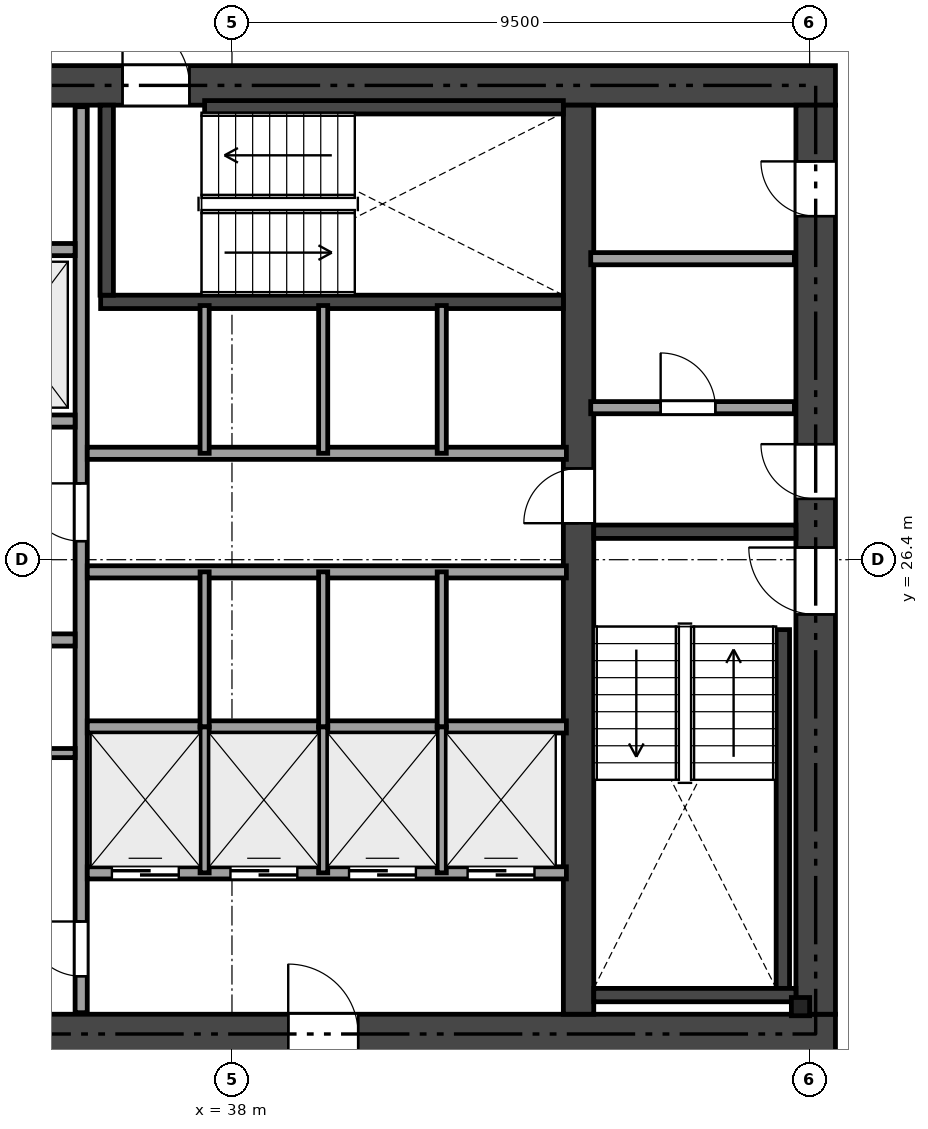
"""IFC4 building model, lengths in metres.
Left out: names, types, materials, properties, quantities, classifications, styles, units other than length and angle.
Written with IfcOpenShell. Run it as: python <this file> out.ifc"""

import sys

from ifc_helpers import new_model, si_unit, direction, frame, frame_2d, origin, origin_2d, place, context, subcontext, project, spatial, rectangle, i_section, extrude, element, fill, save


model = new_model("IFC4")
c1 = context("Model", 3, precision=1e-05, world=origin(), true_north=direction((0.0, 1.0)))
c2 = subcontext(c1, "Body", "Model", "MODEL_VIEW")
j1 = project(units=[si_unit("LENGTHUNIT", "METRE"), si_unit("PLANEANGLEUNIT", "RADIAN")], contexts=[c1])
p1 = place(None, origin())
s1 = spatial("IfcSite", under=j1, at=p1, CompositionType="ELEMENT")
p2 = place(p1, origin())
s2 = spatial("IfcBuilding", under=s1, at=p2, CompositionType="ELEMENT")
p3 = place(p2, frame((0.0, 0.0, 51.15)))
s3 = spatial("IfcBuildingStorey", under=s2, at=p3, CompositionType="ELEMENT", Elevation=51.15)
p4 = place(p3, frame((26.475, 18.6, 0.0), z_axis=(0.0, 0.0, 1.0), x_axis=(1.0, 0.0, 0.0)))
e1 = element("IfcWall", 1, at=p4, inside=s3, PredefinedType="SHEAR", context=c2, shape_type="SweptSolid", body=[
    extrude(rectangle(XDim=21.45, YDim=0.65, at=frame_2d((10.725, 0.0))), origin(), (0.0, 0.0, 1.0), 3.17),
])
p5 = place(p4, frame((12.45, 0.0, 0.0)))
e2 = element("IfcOpeningElement", 2, at=p5, cuts=e1, PredefinedType="OPENING", context=c2, shape_type="SweptSolid", body=[
    extrude(rectangle(XDim=1.15, YDim=2.15, at=frame_2d((0.575, 1.075))), frame((0.0, 0.335, 0.0), z_axis=(0.0, -1.0, 0.0), x_axis=(1.0, 0.0, 0.0)), (0.0, 0.0, 1.0), 0.67),
])
p6 = place(p4, frame((5.275, 0.0, 0.0)))
e3 = element("IfcOpeningElement", 3, at=p6, cuts=e1, PredefinedType="OPENING", context=c2, shape_type="SweptSolid", body=[
    extrude(rectangle(XDim=0.9, YDim=2.1, at=frame_2d((0.45, 1.05))), frame((0.0, 0.335, 0.0), z_axis=(0.0, -1.0, 0.0), x_axis=(1.0, 0.0, 0.0)), (0.0, 0.0, 1.0), 0.67),
])
p7 = place(p3, frame((26.475, 34.2, 0.0), z_axis=(0.0, 0.0, 1.0), x_axis=(1.0, 0.0, 0.0)))
e4 = element("IfcWall", 4, at=p7, inside=s3, PredefinedType="SHEAR", context=c2, shape_type="SweptSolid", body=[
    extrude(rectangle(XDim=21.45, YDim=0.65, at=frame_2d((10.725, 0.0))), origin(), (0.0, 0.0, 1.0), 3.17),
])
p8 = place(p7, frame((9.725, 0.0, 0.0)))
e5 = element("IfcOpeningElement", 5, at=p8, cuts=e4, PredefinedType="OPENING", context=c2, shape_type="SweptSolid", body=[
    extrude(rectangle(XDim=1.1, YDim=2.15, at=frame_2d((0.55, 1.075))), frame((0.0, 0.335, 0.0), z_axis=(0.0, -1.0, 0.0), x_axis=(1.0, 0.0, 0.0)), (0.0, 0.0, 1.0), 0.67),
])
p9 = place(p7, frame((1.975, 0.0, 0.0)))
e6 = element("IfcOpeningElement", 6, at=p9, cuts=e4, PredefinedType="OPENING", context=c2, shape_type="SweptSolid", body=[
    extrude(rectangle(XDim=0.9, YDim=2.1, at=frame_2d((0.45, 1.05))), frame((0.0, 0.335, 0.0), z_axis=(0.0, -1.0, 0.0), x_axis=(1.0, 0.0, 0.0)), (0.0, 0.0, 1.0), 0.67),
])
p10 = place(p7, frame((6.275, 0.0, 0.0)))
e7 = element("IfcOpeningElement", 7, at=p10, cuts=e4, PredefinedType="OPENING", context=c2, shape_type="SweptSolid", body=[
    extrude(rectangle(XDim=0.9, YDim=2.1, at=frame_2d((0.45, 1.05))), frame((0.0, 0.335, 0.0), z_axis=(0.0, -1.0, 0.0), x_axis=(1.0, 0.0, 0.0)), (0.0, 0.0, 1.0), 0.67),
])
p11 = place(p3, frame((47.6, 18.925, 0.0), z_axis=(0.0, 0.0, 1.0), x_axis=(0.0, 1.0, 0.0)))
e8 = element("IfcWall", 8, at=p11, inside=s3, PredefinedType="SHEAR", context=c2, shape_type="SweptSolid", body=[
    extrude(rectangle(XDim=14.95, YDim=0.65, at=frame_2d((7.475, 0.0))), origin(), (0.0, 0.0, 1.0), 3.17),
])
p12 = place(p11, frame((6.575, 0.0, 0.0)))
e9 = element("IfcOpeningElement", 9, at=p12, cuts=e8, PredefinedType="OPENING", context=c2, shape_type="SweptSolid", body=[
    extrude(rectangle(XDim=1.1, YDim=2.15, at=frame_2d((0.55, 1.075))), frame((0.0, 0.335, 0.0), z_axis=(0.0, -1.0, 0.0), x_axis=(1.0, 0.0, 0.0)), (0.0, 0.0, 1.0), 0.67),
])
p13 = place(p11, frame((8.475, 0.0, 0.0)))
e10 = element("IfcOpeningElement", 10, at=p13, cuts=e8, PredefinedType="OPENING", context=c2, shape_type="SweptSolid", body=[
    extrude(rectangle(XDim=0.9, YDim=2.1, at=frame_2d((0.45, 1.05))), frame((0.0, 0.335, 0.0), z_axis=(0.0, -1.0, 0.0), x_axis=(1.0, 0.0, 0.0)), (0.0, 0.0, 1.0), 0.67),
])
p14 = place(p11, frame((13.125, 0.0, 0.0)))
e11 = element("IfcOpeningElement", 11, at=p14, cuts=e8, PredefinedType="OPENING", context=c2, shape_type="SweptSolid", body=[
    extrude(rectangle(XDim=0.9, YDim=2.1, at=frame_2d((0.45, 1.05))), frame((0.0, 0.335, 0.0), z_axis=(0.0, -1.0, 0.0), x_axis=(1.0, 0.0, 0.0)), (0.0, 0.0, 1.0), 0.67),
])
p15 = place(p3, frame((43.7, 18.925, 0.0), z_axis=(0.0, 0.0, 1.0), x_axis=(0.0, 1.0, 0.0)))
e12 = element("IfcWall", 12, at=p15, inside=s3, PredefinedType="SHEAR", context=c2, shape_type="SweptSolid", body=[
    extrude(rectangle(XDim=14.95, YDim=0.5, at=frame_2d((7.475, 0.0))), origin(), (0.0, 0.0, 1.0), 3.17),
])
p16 = place(p15, frame((8.075, 0.0, 0.0)))
e13 = element("IfcOpeningElement", 13, at=p16, cuts=e12, PredefinedType="OPENING", context=c2, shape_type="SweptSolid", body=[
    extrude(rectangle(XDim=0.9, YDim=2.1, at=frame_2d((0.45, 1.05))), frame((0.0, 0.26, 0.0), z_axis=(0.0, -1.0, 0.0), x_axis=(1.0, 0.0, 0.0)), (0.0, 0.0, 1.0), 0.52),
])
p17 = place(p3, frame((43.95, 26.86, 0.0), z_axis=(0.0, 0.0, 1.0), x_axis=(1.0, 0.0, 0.0)))
e14 = element("IfcWall", 14, at=p17, inside=s3, PredefinedType="SHEAR", context=c2, shape_type="SweptSolid", body=[
    extrude(rectangle(XDim=3.325, YDim=0.22, at=frame_2d((1.663, 0.0))), origin(), (0.0, 0.0, 1.0), 3.17),
])
p18 = place(p3, frame((47.06, 19.35, 0.0), z_axis=(0.0, 0.0, 1.0), x_axis=(0.0, 1.0, 0.0)))
e15 = element("IfcWall", 15, at=p18, inside=s3, PredefinedType="SHEAR", context=c2, shape_type="SweptSolid", body=[
    extrude(rectangle(XDim=5.9, YDim=0.22, at=frame_2d((2.95, 0.0))), origin(), (0.0, 0.0, 1.0), 3.17),
])
p19 = place(p3, frame((43.95, 19.24, 0.0), z_axis=(0.0, 0.0, 1.0), x_axis=(1.0, 0.0, 0.0)))
e16 = element("IfcWall", 16, at=p19, inside=s3, PredefinedType="SHEAR", context=c2, shape_type="SweptSolid", body=[
    extrude(rectangle(XDim=3.325, YDim=0.22, at=frame_2d((1.663, 0.0))), origin(), (0.0, 0.0, 1.0), 3.17),
])
p20 = place(p3, frame((35.84, 30.64, 0.0), z_axis=(0.0, 0.0, 1.0), x_axis=(1.0, 0.0, 0.0)))
e17 = element("IfcWall", 17, at=p20, inside=s3, PredefinedType="SHEAR", context=c2, shape_type="SweptSolid", body=[
    extrude(rectangle(XDim=7.61, YDim=0.22, at=frame_2d((3.805, 0.0))), origin(), (0.0, 0.0, 1.0), 3.17),
])
p21 = place(p3, frame((35.94, 30.75, 0.0), z_axis=(0.0, 0.0, 1.0), x_axis=(0.0, 1.0, 0.0)))
e18 = element("IfcWall", 18, at=p21, inside=s3, PredefinedType="SHEAR", context=c2, shape_type="SweptSolid", body=[
    extrude(rectangle(XDim=3.125, YDim=0.22, at=frame_2d((1.562, 0.0))), origin(), (0.0, 0.0, 1.0), 3.17),
])
p22 = place(p3, frame((37.55, 33.84, 0.0), z_axis=(0.0, 0.0, 1.0), x_axis=(1.0, 0.0, 0.0)))
e19 = element("IfcWall", 19, at=p22, inside=s3, PredefinedType="SHEAR", context=c2, shape_type="SweptSolid", body=[
    extrude(rectangle(XDim=5.9, YDim=0.22, at=frame_2d((2.95, 0.0))), origin(), (0.0, 0.0, 1.0), 3.17),
])
p23 = place(p3, frame((47.35, 19.05, 0.0), z_axis=(0.0, 0.0, 1.0), x_axis=(1.0, 0.0, 0.0)))
e20 = element("IfcColumn", 20, at=p23, inside=s3, PredefinedType="PILASTER", context=c2, shape_type="SweptSolid", body=[
    extrude(i_section(OverallWidth=0.3, OverallDepth=0.3, WebThickness=0.011, FlangeThickness=0.019, at=origin_2d()), origin(), (0.0, 0.0, 1.0), 3.17),
])
p24 = place(p3, frame((43.9, 28.9, 0.0), z_axis=(0.0, 0.0, 1.0), x_axis=(1.0, 0.0, 0.0)))
e21 = element("IfcWall", 21, at=p24, inside=s3, PredefinedType="SOLIDWALL", context=c2, shape_type="SweptSolid", body=[
    extrude(rectangle(XDim=3.35, YDim=0.2, at=frame_2d((1.675, 0.0))), origin(), (0.0, 0.0, 1.0), 3.17),
])
p25 = place(p24, frame((1.15, 0.0, 0.0)))
e22 = element("IfcOpeningElement", 22, at=p25, cuts=e21, PredefinedType="OPENING", context=c2, shape_type="SweptSolid", body=[
    extrude(rectangle(XDim=0.9, YDim=2.1, at=frame_2d((0.45, 1.05))), frame((0.0, 0.11, 0.0), z_axis=(0.0, -1.0, 0.0), x_axis=(1.0, 0.0, 0.0)), (0.0, 0.0, 1.0), 0.22),
])
p26 = place(p3, frame((43.9, 31.35, 0.0), z_axis=(0.0, 0.0, 1.0), x_axis=(1.0, 0.0, 0.0)))
e23 = element("IfcWall", 23, at=p26, inside=s3, PredefinedType="SOLIDWALL", context=c2, shape_type="SweptSolid", body=[
    extrude(rectangle(XDim=3.35, YDim=0.2, at=frame_2d((1.675, 0.0))), origin(), (0.0, 0.0, 1.0), 3.17),
])
p27 = place(p3, frame((35.52, 18.95, 0.0), z_axis=(0.0, 0.0, 1.0), x_axis=(0.0, 1.0, 0.0)))
e24 = element("IfcWall", 24, at=p27, inside=s3, PredefinedType="SOLIDWALL", context=c2, shape_type="SweptSolid", body=[
    extrude(rectangle(XDim=14.9, YDim=0.2, at=frame_2d((7.45, 0.0))), origin(), (0.0, 0.0, 1.0), 2.691),
])
p28 = place(p27, frame((7.755, 0.0, 0.0)))
e25 = element("IfcOpeningElement", 25, at=p28, cuts=e24, PredefinedType="OPENING", context=c2, shape_type="SweptSolid", body=[
    extrude(rectangle(XDim=0.95, YDim=2.15, at=frame_2d((0.475, 1.075))), frame((0.0, 0.11, 0.0), z_axis=(0.0, -1.0, 0.0), x_axis=(1.0, 0.0, 0.0)), (0.0, 0.0, 1.0), 0.22),
])
p29 = place(p27, frame((0.6, 0.0, 0.0)))
e26 = element("IfcOpeningElement", 26, at=p29, cuts=e24, PredefinedType="OPENING", context=c2, shape_type="SweptSolid", body=[
    extrude(rectangle(XDim=0.9, YDim=2.1, at=frame_2d((0.45, 1.05))), frame((0.0, 0.11, 0.0), z_axis=(0.0, -1.0, 0.0), x_axis=(1.0, 0.0, 0.0)), (0.0, 0.0, 1.0), 0.22),
])
p30 = place(p3, frame((31.0, 28.68, 0.0), z_axis=(0.0, 0.0, 1.0), x_axis=(1.0, 0.0, 0.0)))
e27 = element("IfcWall", 27, at=p30, inside=s3, PredefinedType="SOLIDWALL", context=c2, shape_type="SweptSolid", body=[
    extrude(rectangle(XDim=4.42, YDim=0.2, at=frame_2d((2.21, 0.0))), origin(), (0.0, 0.0, 1.0), 3.17),
])
p31 = place(p30, frame((0.6, 0.0, 0.0)))
e28 = element("IfcOpeningElement", 28, at=p31, cuts=e27, PredefinedType="OPENING", context=c2, shape_type="SweptSolid", body=[
    extrude(rectangle(XDim=1.1, YDim=2.15, at=frame_2d((0.55, 1.075))), frame((0.0, 0.11, 0.0), z_axis=(0.0, -1.0, 0.0), x_axis=(1.0, 0.0, 0.0)), (0.0, 0.0, 1.0), 0.22),
])
p32 = place(p30, frame((2.85, 0.0, 0.0)))
e29 = element("IfcOpeningElement", 29, at=p32, cuts=e27, PredefinedType="OPENING", context=c2, shape_type="SweptSolid", body=[
    extrude(rectangle(XDim=1.1, YDim=2.15, at=frame_2d((0.55, 1.075))), frame((0.0, 0.11, 0.0), z_axis=(0.0, -1.0, 0.0), x_axis=(1.0, 0.0, 0.0)), (0.0, 0.0, 1.0), 0.22),
])
p33 = place(p3, frame((31.0, 31.5, 0.0), z_axis=(0.0, 0.0, 1.0), x_axis=(1.0, 0.0, 0.0)))
e30 = element("IfcWall", 30, at=p33, inside=s3, PredefinedType="SOLIDWALL", context=c2, shape_type="SweptSolid", body=[
    extrude(rectangle(XDim=4.42, YDim=0.2, at=frame_2d((2.21, 0.0))), origin(), (0.0, 0.0, 1.0), 3.17),
])
p34 = place(p3, frame((31.0, 25.08, 0.0), z_axis=(0.0, 0.0, 1.0), x_axis=(1.0, 0.0, 0.0)))
e31 = element("IfcWall", 31, at=p34, inside=s3, PredefinedType="SOLIDWALL", context=c2, shape_type="SweptSolid", body=[
    extrude(rectangle(XDim=4.42, YDim=0.2, at=frame_2d((2.21, 0.0))), origin(), (0.0, 0.0, 1.0), 3.17),
])
p35 = place(p34, frame((3.0, 0.0, 0.0)))
e32 = element("IfcOpeningElement", 32, at=p35, cuts=e31, PredefinedType="OPENING", context=c2, shape_type="SweptSolid", body=[
    extrude(rectangle(XDim=0.9, YDim=2.1, at=frame_2d((0.45, 1.05))), frame((0.0, 0.11, 0.0), z_axis=(0.0, -1.0, 0.0), x_axis=(1.0, 0.0, 0.0)), (0.0, 0.0, 1.0), 0.22),
])
p36 = place(p34, frame((0.62, 0.0, 0.0)))
e33 = element("IfcOpeningElement", 33, at=p36, cuts=e31, PredefinedType="OPENING", context=c2, shape_type="SweptSolid", body=[
    extrude(rectangle(XDim=1.2, YDim=2.15, at=frame_2d((0.6, 1.075))), frame((0.0, 0.11, 0.0), z_axis=(0.0, -1.0, 0.0), x_axis=(1.0, 0.0, 0.0)), (0.0, 0.0, 1.0), 0.22),
])
p37 = place(p3, frame((33.42, 23.22, 0.0), z_axis=(0.0, 0.0, 1.0), x_axis=(1.0, 0.0, 0.0)))
e34 = element("IfcWall", 34, at=p37, inside=s3, PredefinedType="PARTITIONING", context=c2, shape_type="SweptSolid", body=[
    extrude(rectangle(XDim=2.0, YDim=0.15, at=frame_2d((1.0, 0.0))), origin(), (0.0, 0.0, 1.0), 3.17),
])
for number, where, z_axis, x_axis in (
    (35, (35.62, 28.15, 0.0), (0.0, 0.0, 1.0), (1.0, 0.0, 0.0)),
    (36, (35.62, 26.2, 0.0), (0.0, 0.0, 1.0), (1.0, 0.0, 0.0)),
):
    element("IfcWall", number, at=place(p3, frame(where, z_axis=z_axis, x_axis=x_axis)), inside=s3, PredefinedType="SOLIDWALL", context=c2, shape_type="SweptSolid", body=[
        extrude(rectangle(XDim=7.88, YDim=0.2, at=frame_2d((3.94, 0.0))), origin(), (0.0, 0.0, 1.0), 3.17),
    ])
p38 = place(p3, frame((35.62, 23.65, 0.0), z_axis=(0.0, 0.0, 1.0), x_axis=(1.0, 0.0, 0.0)))
e37 = element("IfcWall", 37, at=p38, inside=s3, PredefinedType="SOLIDWALL", context=c2, shape_type="SweptSolid", body=[
    extrude(rectangle(XDim=7.88, YDim=0.2, at=frame_2d((3.94, 0.0))), origin(), (0.0, 0.0, 1.0), 2.691),
])
p39 = place(p3, frame((35.62, 21.25, 0.0), z_axis=(0.0, 0.0, 1.0), x_axis=(1.0, 0.0, 0.0)))
e38 = element("IfcWall", 38, at=p39, inside=s3, PredefinedType="SOLIDWALL", context=c2, shape_type="SweptSolid", body=[
    extrude(rectangle(XDim=7.88, YDim=0.2, at=frame_2d((3.94, 0.0))), origin(), (0.0, 0.0, 1.0), 3.17),
])
p40 = place(p39, frame((0.405, 0.0, 0.0)))
e39 = element("IfcOpeningElement", 39, at=p40, cuts=e38, PredefinedType="OPENING", context=c2, shape_type="SweptSolid", body=[
    extrude(rectangle(XDim=1.1, YDim=2.15, at=frame_2d((0.55, 1.075))), frame((0.0, 0.11, 0.0), z_axis=(0.0, -1.0, 0.0), x_axis=(1.0, 0.0, 0.0)), (0.0, 0.0, 1.0), 0.22),
])
p41 = place(p39, frame((2.355, 0.0, 0.0)))
e40 = element("IfcOpeningElement", 40, at=p41, cuts=e38, PredefinedType="OPENING", context=c2, shape_type="SweptSolid", body=[
    extrude(rectangle(XDim=1.1, YDim=2.15, at=frame_2d((0.55, 1.075))), frame((0.0, 0.11, 0.0), z_axis=(0.0, -1.0, 0.0), x_axis=(1.0, 0.0, 0.0)), (0.0, 0.0, 1.0), 0.22),
])
p42 = place(p39, frame((4.305, 0.0, 0.0)))
e41 = element("IfcOpeningElement", 41, at=p42, cuts=e38, PredefinedType="OPENING", context=c2, shape_type="SweptSolid", body=[
    extrude(rectangle(XDim=1.1, YDim=2.15, at=frame_2d((0.55, 1.075))), frame((0.0, 0.11, 0.0), z_axis=(0.0, -1.0, 0.0), x_axis=(1.0, 0.0, 0.0)), (0.0, 0.0, 1.0), 0.22),
])
p43 = place(p39, frame((6.255, 0.0, 0.0)))
e42 = element("IfcOpeningElement", 42, at=p43, cuts=e38, PredefinedType="OPENING", context=c2, shape_type="SweptSolid", body=[
    extrude(rectangle(XDim=1.1, YDim=2.15, at=frame_2d((0.55, 1.075))), frame((0.0, 0.11, 0.0), z_axis=(0.0, -1.0, 0.0), x_axis=(1.0, 0.0, 0.0)), (0.0, 0.0, 1.0), 0.22),
])
for number, where, z_axis, x_axis in (
    (43, (37.55, 28.15, 0.0), (0.0, 0.0, 1.0), (0.0, 1.0, 0.0)),
    (44, (39.5, 28.15, 0.0), (0.0, 0.0, 1.0), (0.0, 1.0, 0.0)),
    (45, (41.45, 28.15, 0.0), (0.0, 0.0, 1.0), (0.0, 1.0, 0.0)),
):
    element("IfcWall", number, at=place(p3, frame(where, z_axis=z_axis, x_axis=x_axis)), inside=s3, PredefinedType="PARTITIONING", context=c2, shape_type="SweptSolid", body=[
        extrude(rectangle(XDim=2.43, YDim=0.15, at=frame_2d((1.215, 0.0))), origin(), (0.0, 0.0, 1.0), 3.17),
    ])
for number, where, z_axis, x_axis in (
    (46, (37.55, 23.65, 0.0), (0.0, 0.0, 1.0), (0.0, 1.0, 0.0)),
    (47, (39.5, 23.65, 0.0), (0.0, 0.0, 1.0), (0.0, 1.0, 0.0)),
    (48, (41.45, 23.65, 0.0), (0.0, 0.0, 1.0), (0.0, 1.0, 0.0)),
):
    element("IfcWall", number, at=place(p3, frame(where, z_axis=z_axis, x_axis=x_axis)), inside=s3, PredefinedType="PARTITIONING", context=c2, shape_type="SweptSolid", body=[
        extrude(rectangle(XDim=2.55, YDim=0.15, at=frame_2d((1.275, 0.0))), origin(), (0.0, 0.0, 1.0), 2.691),
    ])
for number, where, z_axis, x_axis in (
    (49, (37.55, 21.25, 0.0), (0.0, 0.0, 1.0), (0.0, 1.0, 0.0)),
    (50, (39.5, 21.25, 0.0), (0.0, 0.0, 1.0), (0.0, 1.0, 0.0)),
    (51, (41.45, 21.25, 0.0), (0.0, 0.0, 1.0), (0.0, 1.0, 0.0)),
):
    element("IfcWall", number, at=place(p3, frame(where, z_axis=z_axis, x_axis=x_axis)), inside=s3, PredefinedType="PARTITIONING", context=c2, shape_type="SweptSolid", body=[
        extrude(rectangle(XDim=2.4, YDim=0.15, at=frame_2d((1.2, 0.0))), origin(), (0.0, 0.0, 1.0), 2.691),
    ])
p44 = place(p12, origin())
e52 = element("IfcDoor", 52, at=p44, inside=s3, OperationType="SINGLE_SWING_RIGHT", PredefinedType="DOOR", context=c2, shape_type="SweptSolid", body=[
    extrude(rectangle(XDim=1.1, YDim=2.15, at=frame_2d((0.55, 1.075))), frame((0.0, 0.025, 0.0), z_axis=(0.0, -1.0, 0.0), x_axis=(1.0, 0.0, 0.0)), (0.0, 0.0, 1.0), 0.05),
])
fill(e9, e52)
p45 = place(p8, origin())
e53 = element("IfcDoor", 53, at=p45, inside=s3, OperationType="SINGLE_SWING_LEFT", PredefinedType="DOOR", context=c2, shape_type="SweptSolid", body=[
    extrude(rectangle(XDim=1.1, YDim=2.15, at=frame_2d((0.55, 1.075))), frame((0.0, 0.025, 0.0), z_axis=(0.0, -1.0, 0.0), x_axis=(1.0, 0.0, 0.0)), (0.0, 0.0, 1.0), 0.05),
])
fill(e5, e53)
p46 = place(p28, origin())
e54 = element("IfcDoor", 54, at=p46, inside=s3, OperationType="SINGLE_SWING_RIGHT", PredefinedType="DOOR", context=c2, shape_type="SweptSolid", body=[
    extrude(rectangle(XDim=0.95, YDim=2.15, at=frame_2d((0.475, 1.075))), frame((0.0, 0.025, 0.0), z_axis=(0.0, -1.0, 0.0), x_axis=(1.0, 0.0, 0.0)), (0.0, 0.0, 1.0), 0.05),
])
fill(e25, e54)
p47 = place(p16, origin())
e55 = element("IfcDoor", 55, at=p47, inside=s3, OperationType="SINGLE_SWING_LEFT", PredefinedType="DOOR", context=c2, shape_type="SweptSolid", body=[
    extrude(rectangle(XDim=0.9, YDim=2.1, at=frame_2d((0.45, 1.05))), frame((0.0, 0.025, 0.0), z_axis=(0.0, -1.0, 0.0), x_axis=(1.0, 0.0, 0.0)), (0.0, 0.0, 1.0), 0.05),
])
fill(e13, e55)
p48 = place(p13, origin())
e56 = element("IfcDoor", 56, at=p48, inside=s3, OperationType="SINGLE_SWING_RIGHT", PredefinedType="DOOR", context=c2, shape_type="SweptSolid", body=[
    extrude(rectangle(XDim=0.9, YDim=2.1, at=frame_2d((0.45, 1.05))), frame((0.0, 0.025, 0.0), z_axis=(0.0, -1.0, 0.0), x_axis=(1.0, 0.0, 0.0)), (0.0, 0.0, 1.0), 0.05),
])
fill(e10, e56)
p49 = place(p5, origin())
e57 = element("IfcDoor", 57, at=p49, inside=s3, OperationType="SINGLE_SWING_LEFT", PredefinedType="DOOR", context=c2, shape_type="SweptSolid", body=[
    extrude(rectangle(XDim=1.15, YDim=2.15, at=frame_2d((0.575, 1.075))), frame((0.0, 0.025, 0.0), z_axis=(0.0, -1.0, 0.0), x_axis=(1.0, 0.0, 0.0)), (0.0, 0.0, 1.0), 0.05),
])
fill(e2, e57)
p50 = place(p25, origin())
e58 = element("IfcDoor", 58, at=p50, inside=s3, OperationType="SINGLE_SWING_LEFT", PredefinedType="DOOR", context=c2, shape_type="SweptSolid", body=[
    extrude(rectangle(XDim=0.9, YDim=2.1, at=frame_2d((0.45, 1.05))), frame((0.0, 0.025, 0.0), z_axis=(0.0, -1.0, 0.0), x_axis=(1.0, 0.0, 0.0)), (0.0, 0.0, 1.0), 0.05),
])
fill(e22, e58)
p51 = place(p14, origin())
e59 = element("IfcDoor", 59, at=p51, inside=s3, OperationType="SINGLE_SWING_RIGHT", PredefinedType="DOOR", context=c2, shape_type="SweptSolid", body=[
    extrude(rectangle(XDim=0.9, YDim=2.1, at=frame_2d((0.45, 1.05))), frame((0.0, 0.025, 0.0), z_axis=(0.0, -1.0, 0.0), x_axis=(1.0, 0.0, 0.0)), (0.0, 0.0, 1.0), 0.05),
])
fill(e11, e59)
p52 = place(p29, origin())
e60 = element("IfcDoor", 60, at=p52, inside=s3, OperationType="SINGLE_SWING_RIGHT", PredefinedType="DOOR", context=c2, shape_type="SweptSolid", body=[
    extrude(rectangle(XDim=0.9, YDim=2.1, at=frame_2d((0.45, 1.05))), frame((0.0, 0.025, 0.0), z_axis=(0.0, -1.0, 0.0), x_axis=(1.0, 0.0, 0.0)), (0.0, 0.0, 1.0), 0.05),
])
fill(e26, e60)
p53 = place(p40, origin())
e61 = element("IfcDoor", 61, at=p53, inside=s3, OperationType="SLIDING_TO_LEFT", PredefinedType="DOOR", context=c2, shape_type="SweptSolid", body=[
    extrude(rectangle(XDim=1.1, YDim=2.15, at=frame_2d((0.55, 1.075))), frame((0.0, 0.025, 0.0), z_axis=(0.0, -1.0, 0.0), x_axis=(1.0, 0.0, 0.0)), (0.0, 0.0, 1.0), 0.05),
])
fill(e39, e61)
p54 = place(p41, origin())
e62 = element("IfcDoor", 62, at=p54, inside=s3, OperationType="SLIDING_TO_LEFT", PredefinedType="DOOR", context=c2, shape_type="SweptSolid", body=[
    extrude(rectangle(XDim=1.1, YDim=2.15, at=frame_2d((0.55, 1.075))), frame((0.0, 0.025, 0.0), z_axis=(0.0, -1.0, 0.0), x_axis=(1.0, 0.0, 0.0)), (0.0, 0.0, 1.0), 0.05),
])
fill(e40, e62)
p55 = place(p42, origin())
e63 = element("IfcDoor", 63, at=p55, inside=s3, OperationType="SLIDING_TO_LEFT", PredefinedType="DOOR", context=c2, shape_type="SweptSolid", body=[
    extrude(rectangle(XDim=1.1, YDim=2.15, at=frame_2d((0.55, 1.075))), frame((0.0, 0.025, 0.0), z_axis=(0.0, -1.0, 0.0), x_axis=(1.0, 0.0, 0.0)), (0.0, 0.0, 1.0), 0.05),
])
fill(e41, e63)
p56 = place(p43, origin())
e64 = element("IfcDoor", 64, at=p56, inside=s3, OperationType="SLIDING_TO_LEFT", PredefinedType="DOOR", context=c2, shape_type="SweptSolid", body=[
    extrude(rectangle(XDim=1.1, YDim=2.15, at=frame_2d((0.55, 1.075))), frame((0.0, 0.025, 0.0), z_axis=(0.0, -1.0, 0.0), x_axis=(1.0, 0.0, 0.0)), (0.0, 0.0, 1.0), 0.05),
])
fill(e42, e64)
save(model, sys.argv[1])
